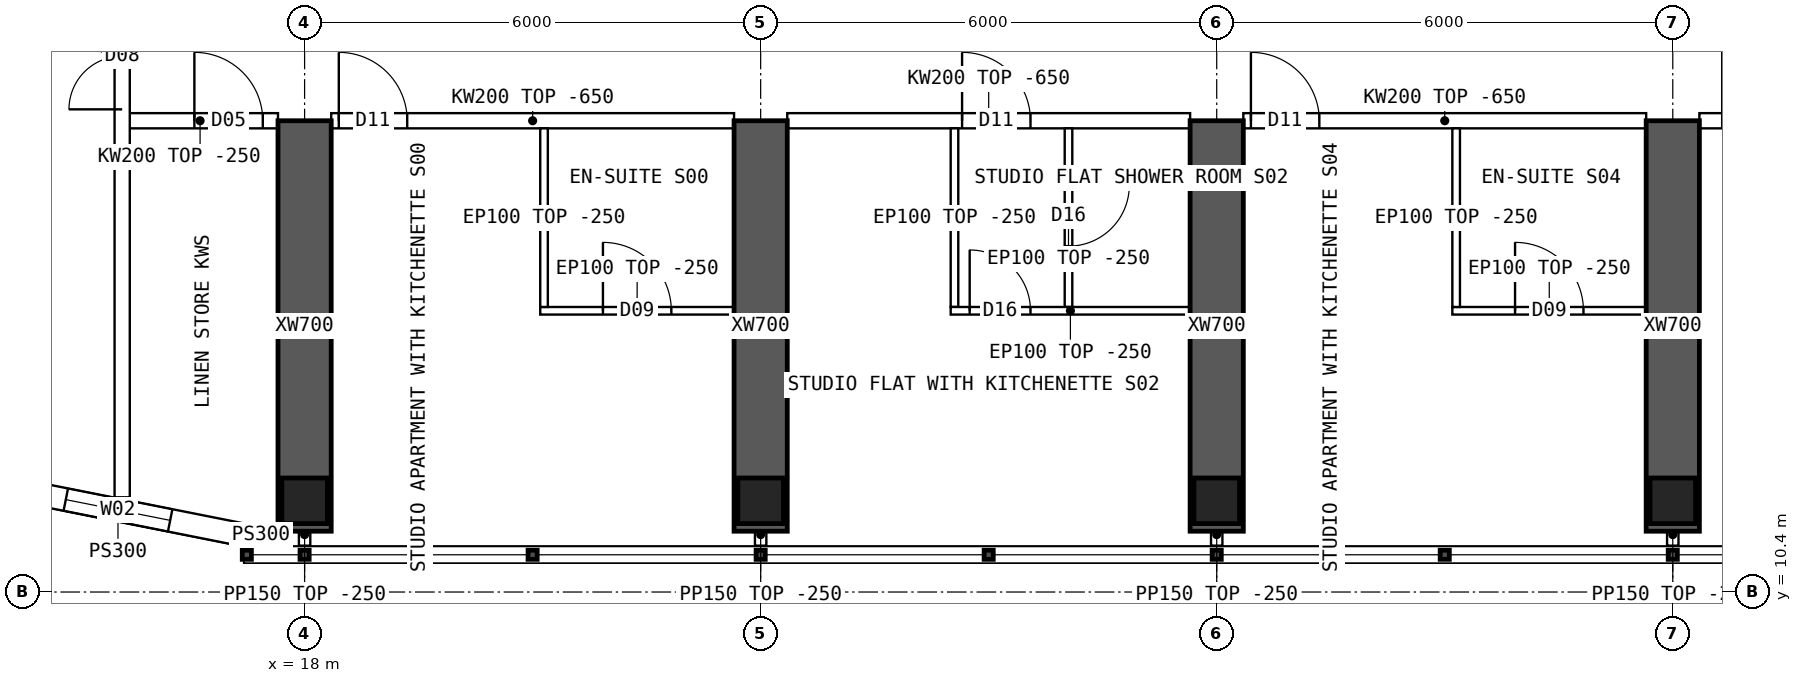
"""IFC4 building model, lengths in metres.
Left out: names, types, materials, properties, quantities, classifications, styles, units other than length and angle.
Written with IfcOpenShell. Run it as: python <this file> out.ifc"""

import sys

from ifc_helpers import new_model, si_unit, direction, frame, frame_2d, origin, origin_2d, place, context, subcontext, project, spatial, polyline, rectangle, hollow_rectangle, outline, extrude, element, fill, save


model = new_model("IFC4")
c1 = context("Model", 3, precision=1e-05, world=origin(), true_north=direction((0.0, 1.0)))
c2 = subcontext(c1, "Body", "Model", "MODEL_VIEW")
j1 = project(units=[si_unit("LENGTHUNIT", "METRE"), si_unit("PLANEANGLEUNIT", "RADIAN")], contexts=[c1])
p1 = place(None, origin())
s1 = spatial("IfcSite", under=j1, at=p1, CompositionType="ELEMENT")
p2 = place(p1, origin())
s2 = spatial("IfcBuilding", under=s1, at=p2, CompositionType="ELEMENT")
p3 = place(p2, frame((0.0, 0.0, 216.55)))
s3 = spatial("IfcBuildingStorey", under=s2, at=p3, CompositionType="ELEMENT", Elevation=216.55)
for number, where, z_axis, x_axis in (
    (1, (18.0, 11.6, 0.0), (0.0, 0.0, 1.0), (1.0, 0.0, 0.0)),
    (2, (24.0, 11.6, 0.0), (0.0, 0.0, 1.0), (1.0, 0.0, 0.0)),
    (3, (30.0, 11.6, 0.0), (0.0, 0.0, 1.0), (1.0, 0.0, 0.0)),
    (4, (36.0, 11.6, 0.0), (0.0, 0.0, 1.0), (1.0, 0.0, 0.0)),
):
    element("IfcColumn", number, at=place(p3, frame(where, z_axis=z_axis, x_axis=x_axis)), inside=s3, PredefinedType="COLUMN", context=c2, shape_type="SweptSolid", body=[
        extrude(hollow_rectangle(XDim=0.6, YDim=0.6, WallThickness=0.06, at=origin_2d()), origin(), (0.0, 0.0, 1.0), 3.75),
    ])
for number, where, z_axis, x_axis in (
    (5, (18.0, 11.2, 0.0), (0.0, 0.0, 1.0), (0.0, 1.0, 0.0)),
    (6, (24.0, 11.2, 0.0), (0.0, 0.0, 1.0), (0.0, 1.0, 0.0)),
    (7, (30.0, 11.2, 0.0), (0.0, 0.0, 1.0), (0.0, 1.0, 0.0)),
    (8, (36.0, 11.2, 0.0), (0.0, 0.0, 1.0), (0.0, 1.0, 0.0)),
):
    element("IfcWall", number, at=place(p3, frame(where, z_axis=z_axis, x_axis=x_axis)), inside=s3, PredefinedType="SHEAR", context=c2, shape_type="SweptSolid", body=[
        extrude(rectangle(XDim=5.4, YDim=0.7, at=frame_2d((2.7, 0.0))), origin(), (0.0, 0.0, 1.0), 3.75),
    ])
p4 = place(p3, frame((13.89, 11.808, 0.0), z_axis=(0.0, 0.0, 1.0), x_axis=(0.98078325777, -0.195100490205, 0.0)))
e9 = element("IfcWall", 9, at=p4, inside=s3, PredefinedType="SOLIDWALL", context=c2, shape_type="SweptSolid", body=[
    extrude(outline(polyline([(-0.03, -0.15), (3.405, -0.15), (3.345, 0.15), (0.03, 0.15), (-0.03, -0.15)])), origin(), (0.0, 0.0, 1.0), 3.5),
])
p5 = place(p4, frame((0.988, 0.0, 0.9)))
e10 = element("IfcOpeningElement", 10, at=p5, cuts=e9, PredefinedType="OPENING", context=c2, shape_type="SweptSolid", body=[
    extrude(rectangle(XDim=1.4, YDim=1.8, at=frame_2d((0.7, 0.9))), frame((0.0, 0.16, 0.0), z_axis=(0.0, -1.0, 0.0), x_axis=(1.0, 0.0, 0.0)), (0.0, 0.0, 1.0), 0.32),
])
p6 = place(p3, frame((17.2, 11.15, 0.0), z_axis=(0.0, 0.0, 1.0), x_axis=(1.0, 0.0, 0.0)))
e11 = element("IfcWall", 11, at=p6, inside=s3, PredefinedType="SOLIDWALL", context=c2, shape_type="SweptSolid", body=[
    extrude(rectangle(XDim=0.45, YDim=0.3, at=frame_2d((0.225, 0.0))), origin(), (0.0, 0.0, 1.0), 3.5),
])
p7 = place(p3, frame((15.6, 16.6, 0.0), z_axis=(0.0, 0.0, 1.0), x_axis=(1.0, 0.0, 0.0)))
e12 = element("IfcWall", 12, at=p7, inside=s3, PredefinedType="SOLIDWALL", context=c2, shape_type="SweptSolid", body=[
    extrude(rectangle(XDim=2.05, YDim=0.2, at=frame_2d((1.025, 0.0))), origin(), (0.0, 0.0, 1.0), 3.5),
])
p8 = place(p7, frame((0.95, 0.0, 0.0)))
e13 = element("IfcOpeningElement", 13, at=p8, cuts=e12, PredefinedType="OPENING", context=c2, shape_type="SweptSolid", body=[
    extrude(rectangle(XDim=0.9, YDim=2.1, at=frame_2d((0.45, 1.05))), frame((0.0, 0.11, 0.0), z_axis=(0.0, -1.0, 0.0), x_axis=(1.0, 0.0, 0.0)), (0.0, 0.0, 1.0), 0.22),
])
p9 = place(p3, frame((18.35, 16.6, 0.0), z_axis=(0.0, 0.0, 1.0), x_axis=(1.0, 0.0, 0.0)))
e14 = element("IfcWall", 14, at=p9, inside=s3, PredefinedType="SOLIDWALL", context=c2, shape_type="SweptSolid", body=[
    extrude(outline(polyline([(0.0, 0.0), (5.3, 0.0), (5.3, 3.1), (0.0, 3.1), (0.0, 0.0)])), frame((0.0, 0.1, 0.0), z_axis=(0.0, -1.0, 0.0), x_axis=(1.0, 0.0, 0.0)), (0.0, 0.0, 1.0), 0.2),
])
p10 = place(p9, frame((0.1, 0.0, 0.0)))
e15 = element("IfcOpeningElement", 15, at=p10, cuts=e14, PredefinedType="OPENING", context=c2, shape_type="SweptSolid", body=[
    extrude(rectangle(XDim=0.9, YDim=2.1, at=frame_2d((0.45, 1.05))), frame((0.0, 0.11, 0.0), z_axis=(0.0, -1.0, 0.0), x_axis=(1.0, 0.0, 0.0)), (0.0, 0.0, 1.0), 0.22),
])
p11 = place(p3, frame((24.35, 16.6, 0.0), z_axis=(0.0, 0.0, 1.0), x_axis=(1.0, 0.0, 0.0)))
e16 = element("IfcWall", 16, at=p11, inside=s3, PredefinedType="SOLIDWALL", context=c2, shape_type="SweptSolid", body=[
    extrude(outline(polyline([(0.0, 0.0), (5.3, 0.0), (5.3, 3.1), (0.0, 3.1), (0.0, 0.0)])), frame((0.0, 0.1, 0.0), z_axis=(0.0, -1.0, 0.0), x_axis=(1.0, 0.0, 0.0)), (0.0, 0.0, 1.0), 0.2),
])
p12 = place(p11, frame((2.3, 0.0, 0.0)))
e17 = element("IfcOpeningElement", 17, at=p12, cuts=e16, PredefinedType="OPENING", context=c2, shape_type="SweptSolid", body=[
    extrude(rectangle(XDim=0.9, YDim=2.1, at=frame_2d((0.45, 1.05))), frame((0.0, 0.11, 0.0), z_axis=(0.0, -1.0, 0.0), x_axis=(1.0, 0.0, 0.0)), (0.0, 0.0, 1.0), 0.22),
])
p13 = place(p3, frame((30.35, 16.6, 0.0), z_axis=(0.0, 0.0, 1.0), x_axis=(1.0, 0.0, 0.0)))
e18 = element("IfcWall", 18, at=p13, inside=s3, PredefinedType="SOLIDWALL", context=c2, shape_type="SweptSolid", body=[
    extrude(outline(polyline([(0.0, 0.0), (5.3, 0.0), (5.3, 3.1), (0.0, 3.1), (0.0, 0.0)])), frame((0.0, 0.1, 0.0), z_axis=(0.0, -1.0, 0.0), x_axis=(1.0, 0.0, 0.0)), (0.0, 0.0, 1.0), 0.2),
])
p14 = place(p13, frame((0.1, 0.0, 0.0)))
e19 = element("IfcOpeningElement", 19, at=p14, cuts=e18, PredefinedType="OPENING", context=c2, shape_type="SweptSolid", body=[
    extrude(rectangle(XDim=0.9, YDim=2.1, at=frame_2d((0.45, 1.05))), frame((0.0, 0.11, 0.0), z_axis=(0.0, -1.0, 0.0), x_axis=(1.0, 0.0, 0.0)), (0.0, 0.0, 1.0), 0.22),
])
p15 = place(p3, frame((36.35, 16.6, 0.0), z_axis=(0.0, 0.0, 1.0), x_axis=(1.0, 0.0, 0.0)))
e20 = element("IfcWall", 20, at=p15, inside=s3, PredefinedType="SOLIDWALL", context=c2, shape_type="SweptSolid", body=[
    extrude(outline(polyline([(0.0, 0.0), (5.3, 0.0), (5.3, 3.1), (0.0, 3.1), (0.0, 0.0)])), frame((0.0, 0.1, 0.0), z_axis=(0.0, -1.0, 0.0), x_axis=(1.0, 0.0, 0.0)), (0.0, 0.0, 1.0), 0.2),
])
p16 = place(p15, frame((0.3, 0.0, 0.0)))
e21 = element("IfcOpeningElement", 21, at=p16, cuts=e20, PredefinedType="OPENING", context=c2, shape_type="SweptSolid", body=[
    extrude(rectangle(XDim=1.0, YDim=2.1, at=frame_2d((0.5, 1.05))), frame((0.0, 0.11, 0.0), z_axis=(0.0, -1.0, 0.0), x_axis=(1.0, 0.0, 0.0)), (0.0, 0.0, 1.0), 0.22),
])
p17 = place(p3, frame((23.65, 14.1, 0.0), z_axis=(0.0, 0.0, 1.0), x_axis=(-1.0, 0.0, 0.0)))
e22 = element("IfcWall", 22, at=p17, inside=s3, PredefinedType="PARTITIONING", context=c2, shape_type="SweptSolid", body=[
    extrude(rectangle(XDim=2.55, YDim=0.1, at=frame_2d((1.275, 0.0))), origin(), (0.0, 0.0, 1.0), 3.5),
])
p18 = place(p17, frame((0.825, 0.0, 0.0)))
e23 = element("IfcOpeningElement", 23, at=p18, cuts=e22, PredefinedType="OPENING", context=c2, shape_type="SweptSolid", body=[
    extrude(rectangle(XDim=0.9, YDim=2.1, at=frame_2d((0.45, 1.05))), frame((0.0, 0.06, 0.0), z_axis=(0.0, -1.0, 0.0), x_axis=(1.0, 0.0, 0.0)), (0.0, 0.0, 1.0), 0.12),
])
p19 = place(p3, frame((21.15, 14.15, 0.0), z_axis=(0.0, 0.0, 1.0), x_axis=(0.0, 1.0, 0.0)))
e24 = element("IfcWall", 24, at=p19, inside=s3, PredefinedType="PARTITIONING", context=c2, shape_type="SweptSolid", body=[
    extrude(outline(polyline([(0.0, 0.0), (2.35, 0.0), (2.35, 3.1), (2.302, 3.1), (2.3, 3.5), (0.0, 3.5), (0.0, 0.0)])), frame((0.0, 0.05, 0.0), z_axis=(0.0, -1.0, 0.0), x_axis=(1.0, 0.0, 0.0)), (0.0, 0.0, 1.0), 0.1),
])
p20 = place(p3, frame((29.65, 14.1, 0.0), z_axis=(0.0, 0.0, 1.0), x_axis=(-1.0, 0.0, 0.0)))
e25 = element("IfcWall", 25, at=p20, inside=s3, PredefinedType="PARTITIONING", context=c2, shape_type="SweptSolid", body=[
    extrude(rectangle(XDim=3.15, YDim=0.1, at=frame_2d((1.575, 0.0))), origin(), (0.0, 0.0, 1.0), 3.5),
])
p21 = place(p20, frame((2.1, 0.0, 0.0)))
e26 = element("IfcOpeningElement", 26, at=p21, cuts=e25, PredefinedType="OPENING", context=c2, shape_type="SweptSolid", body=[
    extrude(rectangle(XDim=0.8, YDim=2.1, at=frame_2d((0.4, 1.05))), frame((0.0, 0.06, 0.0), z_axis=(0.0, -1.0, 0.0), x_axis=(1.0, 0.0, 0.0)), (0.0, 0.0, 1.0), 0.12),
])
p22 = place(p3, frame((26.55, 14.15, 0.0), z_axis=(0.0, 0.0, 1.0), x_axis=(0.0, 1.0, 0.0)))
e27 = element("IfcWall", 27, at=p22, inside=s3, PredefinedType="PARTITIONING", context=c2, shape_type="SweptSolid", body=[
    extrude(outline(polyline([(0.0, 0.0), (2.35, 0.0), (2.35, 3.1), (2.302, 3.1), (2.3, 3.5), (0.0, 3.5), (0.0, 0.0)])), frame((0.0, 0.05, 0.0), z_axis=(0.0, -1.0, 0.0), x_axis=(1.0, 0.0, 0.0)), (0.0, 0.0, 1.0), 0.1),
])
p23 = place(p3, frame((28.05, 14.15, 0.0), z_axis=(0.0, 0.0, 1.0), x_axis=(0.0, 1.0, 0.0)))
e28 = element("IfcWall", 28, at=p23, inside=s3, PredefinedType="PARTITIONING", context=c2, shape_type="SweptSolid", body=[
    extrude(outline(polyline([(0.0, 0.0), (2.35, 0.0), (2.35, 3.1), (2.302, 3.1), (2.3, 3.5), (0.0, 3.5), (0.0, 0.0)])), frame((0.0, 0.05, 0.0), z_axis=(0.0, -1.0, 0.0), x_axis=(1.0, 0.0, 0.0)), (0.0, 0.0, 1.0), 0.1),
])
p24 = place(p23, frame((0.8, 0.0, 0.0)))
e29 = element("IfcOpeningElement", 29, at=p24, cuts=e28, PredefinedType="OPENING", context=c2, shape_type="SweptSolid", body=[
    extrude(rectangle(XDim=0.8, YDim=2.1, at=frame_2d((0.4, 1.05))), frame((0.0, 0.06, 0.0), z_axis=(0.0, -1.0, 0.0), x_axis=(1.0, 0.0, 0.0)), (0.0, 0.0, 1.0), 0.12),
])
p25 = place(p3, frame((35.65, 14.1, 0.0), z_axis=(0.0, 0.0, 1.0), x_axis=(-1.0, 0.0, 0.0)))
e30 = element("IfcWall", 30, at=p25, inside=s3, PredefinedType="PARTITIONING", context=c2, shape_type="SweptSolid", body=[
    extrude(rectangle(XDim=2.55, YDim=0.1, at=frame_2d((1.275, 0.0))), origin(), (0.0, 0.0, 1.0), 3.5),
])
p26 = place(p25, frame((0.825, 0.0, 0.0)))
e31 = element("IfcOpeningElement", 31, at=p26, cuts=e30, PredefinedType="OPENING", context=c2, shape_type="SweptSolid", body=[
    extrude(rectangle(XDim=0.9, YDim=2.1, at=frame_2d((0.45, 1.05))), frame((0.0, 0.06, 0.0), z_axis=(0.0, -1.0, 0.0), x_axis=(1.0, 0.0, 0.0)), (0.0, 0.0, 1.0), 0.12),
])
p27 = place(p3, frame((33.15, 14.15, 0.0), z_axis=(0.0, 0.0, 1.0), x_axis=(0.0, 1.0, 0.0)))
e32 = element("IfcWall", 32, at=p27, inside=s3, PredefinedType="PARTITIONING", context=c2, shape_type="SweptSolid", body=[
    extrude(outline(polyline([(0.0, 0.0), (2.35, 0.0), (2.35, 3.1), (2.302, 3.1), (2.3, 3.5), (0.0, 3.5), (0.0, 0.0)])), frame((0.0, 0.05, 0.0), z_axis=(0.0, -1.0, 0.0), x_axis=(1.0, 0.0, 0.0)), (0.0, 0.0, 1.0), 0.1),
])
p28 = place(p3, frame((15.6, 11.646, 0.0), z_axis=(0.0, 0.0, 1.0), x_axis=(0.0, 1.0, 0.0)))
e33 = element("IfcWall", 33, at=p28, inside=s3, PredefinedType="SOLIDWALL", context=c2, shape_type="SweptSolid", body=[
    extrude(rectangle(XDim=40.708, YDim=0.2, at=frame_2d((20.354, 0.0))), origin(), (0.0, 0.0, 1.0), 3.5),
])
p29 = place(p28, frame((13.434, 0.0, 0.0)))
e34 = element("IfcOpeningElement", 34, at=p29, cuts=e33, PredefinedType="OPENING", context=c2, shape_type="SweptSolid", body=[
    extrude(rectangle(XDim=1.2, YDim=2.1, at=frame_2d((0.6, 1.05))), frame((0.0, 0.11, 0.0), z_axis=(0.0, -1.0, 0.0), x_axis=(1.0, 0.0, 0.0)), (0.0, 0.0, 1.0), 0.22),
])
p30 = place(p28, frame((5.104, 0.0, 0.0)))
e35 = element("IfcOpeningElement", 35, at=p30, cuts=e33, PredefinedType="OPENING", context=c2, shape_type="SweptSolid", body=[
    extrude(rectangle(XDim=1.4, YDim=2.1, at=frame_2d((0.7, 1.05))), frame((0.0, 0.11, 0.0), z_axis=(0.0, -1.0, 0.0), x_axis=(1.0, 0.0, 0.0)), (0.0, 0.0, 1.0), 0.22),
])
p31 = place(p28, frame((34.104, 0.0, 0.0)))
e36 = element("IfcOpeningElement", 36, at=p31, cuts=e33, PredefinedType="OPENING", context=c2, shape_type="SweptSolid", body=[
    extrude(rectangle(XDim=1.4, YDim=2.1, at=frame_2d((0.7, 1.05))), frame((0.0, 0.11, 0.0), z_axis=(0.0, -1.0, 0.0), x_axis=(1.0, 0.0, 0.0)), (0.0, 0.0, 1.0), 0.22),
])
for number, where, z_axis, x_axis in (
    (37, (18.0, 11.3, 0.0), (0.0, 0.0, 1.0), (0.0, -1.0, 0.0)),
    (38, (24.0, 11.3, 0.0), (0.0, 0.0, 1.0), (0.0, -1.0, 0.0)),
    (39, (30.0, 11.3, 0.0), (0.0, 0.0, 1.0), (0.0, -1.0, 0.0)),
    (40, (36.0, 11.3, 0.0), (0.0, 0.0, 1.0), (0.0, -1.0, 0.0)),
):
    element("IfcWall", number, at=place(p3, frame(where, z_axis=z_axis, x_axis=x_axis)), inside=s3, PredefinedType="PARTITIONING", context=c2, shape_type="SweptSolid", body=[
        extrude(rectangle(XDim=0.29, YDim=0.15, at=frame_2d((0.145, 0.0))), origin(), (0.0, 0.0, 1.0), 3.5),
    ])
p32 = place(p5, origin())
e41 = element("IfcWindow", 41, at=p32, inside=s3, PartitioningType="SINGLE_PANEL", PredefinedType="WINDOW", context=c2, shape_type="SweptSolid", body=[
    extrude(rectangle(XDim=1.4, YDim=1.8, at=frame_2d((0.7, 0.9))), frame((0.0, 0.03, 0.0), z_axis=(0.0, -1.0, 0.0), x_axis=(1.0, 0.0, 0.0)), (0.0, 0.0, 1.0), 0.06),
])
fill(e10, e41)
p33 = place(p18, origin())
e42 = element("IfcDoor", 42, at=p33, inside=s3, OperationType="SINGLE_SWING_RIGHT", PredefinedType="DOOR", context=c2, shape_type="SweptSolid", body=[
    extrude(rectangle(XDim=0.9, YDim=2.1, at=frame_2d((0.45, 1.05))), frame((0.0, 0.025, 0.0), z_axis=(0.0, -1.0, 0.0), x_axis=(1.0, 0.0, 0.0)), (0.0, 0.0, 1.0), 0.05),
])
fill(e23, e42)
p34 = place(p10, origin())
e43 = element("IfcDoor", 43, at=p34, inside=s3, OperationType="SINGLE_SWING_LEFT", PredefinedType="DOOR", context=c2, shape_type="SweptSolid", body=[
    extrude(rectangle(XDim=0.9, YDim=2.1, at=frame_2d((0.45, 1.05))), frame((0.0, 0.025, 0.0), z_axis=(0.0, -1.0, 0.0), x_axis=(1.0, 0.0, 0.0)), (0.0, 0.0, 1.0), 0.05),
])
fill(e15, e43)
p35 = place(p21, origin())
e44 = element("IfcDoor", 44, at=p35, inside=s3, OperationType="SINGLE_SWING_RIGHT", PredefinedType="DOOR", context=c2, shape_type="SweptSolid", body=[
    extrude(rectangle(XDim=0.8, YDim=2.1, at=frame_2d((0.4, 1.05))), frame((0.0, 0.025, 0.0), z_axis=(0.0, -1.0, 0.0), x_axis=(1.0, 0.0, 0.0)), (0.0, 0.0, 1.0), 0.05),
])
fill(e26, e44)
p36 = place(p24, origin())
e45 = element("IfcDoor", 45, at=p36, inside=s3, OperationType="SINGLE_SWING_RIGHT", PredefinedType="DOOR", context=c2, shape_type="SweptSolid", body=[
    extrude(rectangle(XDim=0.8, YDim=2.1, at=frame_2d((0.4, 1.05))), frame((0.0, 0.025, 0.0), z_axis=(0.0, -1.0, 0.0), x_axis=(1.0, 0.0, 0.0)), (0.0, 0.0, 1.0), 0.05),
])
fill(e29, e45)
p37 = place(p12, origin())
e46 = element("IfcDoor", 46, at=p37, inside=s3, OperationType="SINGLE_SWING_LEFT", PredefinedType="DOOR", context=c2, shape_type="SweptSolid", body=[
    extrude(rectangle(XDim=0.9, YDim=2.1, at=frame_2d((0.45, 1.05))), frame((0.0, 0.025, 0.0), z_axis=(0.0, -1.0, 0.0), x_axis=(1.0, 0.0, 0.0)), (0.0, 0.0, 1.0), 0.05),
])
fill(e17, e46)
p38 = place(p26, origin())
e47 = element("IfcDoor", 47, at=p38, inside=s3, OperationType="SINGLE_SWING_RIGHT", PredefinedType="DOOR", context=c2, shape_type="SweptSolid", body=[
    extrude(rectangle(XDim=0.9, YDim=2.1, at=frame_2d((0.45, 1.05))), frame((0.0, 0.025, 0.0), z_axis=(0.0, -1.0, 0.0), x_axis=(1.0, 0.0, 0.0)), (0.0, 0.0, 1.0), 0.05),
])
fill(e31, e47)
p39 = place(p14, origin())
e48 = element("IfcDoor", 48, at=p39, inside=s3, OperationType="SINGLE_SWING_LEFT", PredefinedType="DOOR", context=c2, shape_type="SweptSolid", body=[
    extrude(rectangle(XDim=0.9, YDim=2.1, at=frame_2d((0.45, 1.05))), frame((0.0, 0.025, 0.0), z_axis=(0.0, -1.0, 0.0), x_axis=(1.0, 0.0, 0.0)), (0.0, 0.0, 1.0), 0.05),
])
fill(e19, e48)
p40 = place(p30, origin())
e49 = element("IfcDoor", 49, at=p40, inside=s3, OperationType="DOUBLE_DOOR_SINGLE_SWING", PredefinedType="DOOR", context=c2, shape_type="SweptSolid", body=[
    extrude(rectangle(XDim=1.4, YDim=2.1, at=frame_2d((0.7, 1.05))), frame((0.0, 0.025, 0.0), z_axis=(0.0, -1.0, 0.0), x_axis=(1.0, 0.0, 0.0)), (0.0, 0.0, 1.0), 0.05),
])
fill(e35, e49)
p41 = place(p8, origin())
e50 = element("IfcDoor", 50, at=p41, inside=s3, OperationType="SINGLE_SWING_LEFT", PredefinedType="DOOR", context=c2, shape_type="SweptSolid", body=[
    extrude(rectangle(XDim=0.9, YDim=2.1, at=frame_2d((0.45, 1.05))), frame((0.0, 0.025, 0.0), z_axis=(0.0, -1.0, 0.0), x_axis=(1.0, 0.0, 0.0)), (0.0, 0.0, 1.0), 0.05),
])
fill(e13, e50)
save(model, sys.argv[1])
